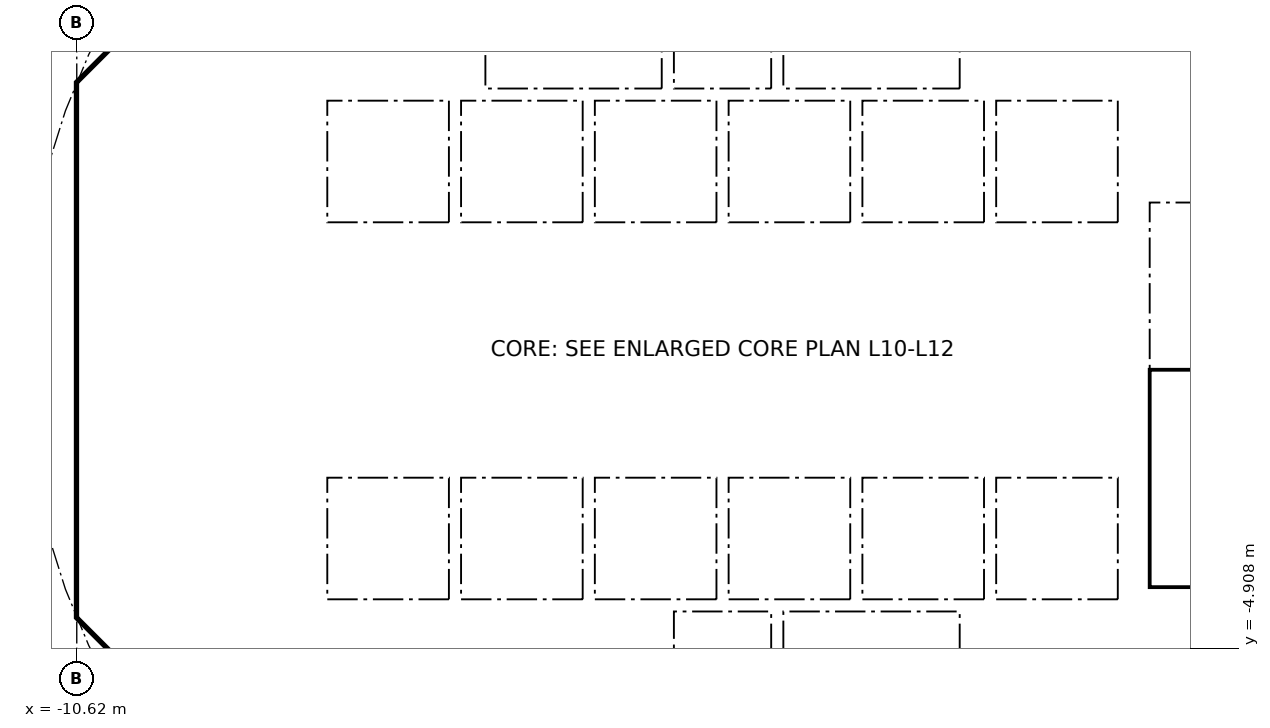
"""IFC4 building model, lengths in metres.
Left out: names, types, materials, properties, quantities, classifications, styles, units other than length and angle.
Written with IfcOpenShell. Run it as: python <this file> out.ifc"""

import sys

from ifc_helpers import new_model, si_unit, direction, frame, frame_2d, origin, place, context, subcontext, project, spatial, polyline, rectangle, outline, extrude, element, fill, save


model = new_model("IFC4")
c1 = context("Model", 3, precision=1e-05, world=origin(), true_north=direction((0.0, 1.0)))
c2 = subcontext(c1, "Body", "Model", "MODEL_VIEW")
j1 = project(units=[si_unit("LENGTHUNIT", "METRE"), si_unit("PLANEANGLEUNIT", "RADIAN")], contexts=[c1])
p1 = place(None, origin())
s1 = spatial("IfcSite", under=j1, at=p1, CompositionType="ELEMENT")
p2 = place(p1, origin())
s2 = spatial("IfcBuilding", under=s1, at=p2, CompositionType="ELEMENT")
p3 = place(p2, frame((0.0, 0.0, 45.5)))
s3 = spatial("IfcBuildingStorey", under=s2, at=p3, CompositionType="ELEMENT", Elevation=45.5)
p4 = place(p3, frame((9.988, 4.613, 0.0), z_axis=(0.0, 0.0, 1.0), x_axis=(-0.707106781187, 0.707106781187, 0.0)))
e1 = element("IfcWall", 1, at=p4, inside=s3, PredefinedType="SHEAR", context=c2, shape_type="SweptSolid", body=[
    extrude(rectangle(XDim=7.602, YDim=0.6, at=frame_2d((3.801, 0.0))), origin(), (0.0, 0.0, 1.0), 3.44),
])
p5 = place(p4, frame((3.201, 0.0, 0.0)))
e2 = element("IfcOpeningElement", 2, at=p5, cuts=e1, PredefinedType="OPENING", context=c2, shape_type="SweptSolid", body=[
    extrude(rectangle(XDim=1.2, YDim=2.1, at=frame_2d((0.6, 1.05))), frame((0.0, 0.31, 0.0), z_axis=(0.0, -1.0, 0.0), x_axis=(1.0, 0.0, 0.0)), (0.0, 0.0, 1.0), 0.62),
])
p6 = place(p3, frame((-4.613, 9.988, 0.0), z_axis=(0.0, 0.0, 1.0), x_axis=(-0.707106781187, -0.707106781187, 0.0)))
e3 = element("IfcWall", 3, at=p6, inside=s3, PredefinedType="SHEAR", context=c2, shape_type="SweptSolid", body=[
    extrude(rectangle(XDim=7.602, YDim=0.6, at=frame_2d((3.801, 0.0))), origin(), (0.0, 0.0, 1.0), 3.44),
])
p7 = place(p6, frame((0.351, 0.0, 0.0)))
e4 = element("IfcOpeningElement", 4, at=p7, cuts=e3, PredefinedType="OPENING", context=c2, shape_type="SweptSolid", body=[
    extrude(rectangle(XDim=1.1, YDim=2.1, at=frame_2d((0.55, 1.05))), frame((0.0, 0.31, 0.0), z_axis=(0.0, -1.0, 0.0), x_axis=(1.0, 0.0, 0.0)), (0.0, 0.0, 1.0), 0.62),
])
p8 = place(p3, frame((-10.325, 3.801, 0.0), z_axis=(0.0, 0.0, 1.0), x_axis=(0.0, -1.0, 0.0)))
e5 = element("IfcWall", 5, at=p8, inside=s3, PredefinedType="SHEAR", context=c2, shape_type="SweptSolid", body=[
    extrude(rectangle(XDim=7.602, YDim=0.6, at=frame_2d((3.801, 0.0))), origin(), (0.0, 0.0, 1.0), 3.44),
])
p9 = place(p8, frame((0.651, 0.0, 0.0)))
e6 = element("IfcOpeningElement", 6, at=p9, cuts=e5, PredefinedType="OPENING", context=c2, shape_type="SweptSolid", body=[
    extrude(rectangle(XDim=1.5, YDim=2.1, at=frame_2d((0.75, 1.05))), frame((0.0, 0.31, 0.0), z_axis=(0.0, -1.0, 0.0), x_axis=(1.0, 0.0, 0.0)), (0.0, 0.0, 1.0), 0.62),
])
p10 = place(p8, frame((5.451, 0.0, 0.0)))
e7 = element("IfcOpeningElement", 7, at=p10, cuts=e5, PredefinedType="OPENING", context=c2, shape_type="SweptSolid", body=[
    extrude(rectangle(XDim=1.5, YDim=2.1, at=frame_2d((0.75, 1.05))), frame((0.0, 0.31, 0.0), z_axis=(0.0, -1.0, 0.0), x_axis=(1.0, 0.0, 0.0)), (0.0, 0.0, 1.0), 0.62),
])
p11 = place(p3, frame((-9.988, -4.613, 0.0), z_axis=(0.0, 0.0, 1.0), x_axis=(0.707106781187, -0.707106781187, 0.0)))
e8 = element("IfcWall", 8, at=p11, inside=s3, PredefinedType="SHEAR", context=c2, shape_type="SweptSolid", body=[
    extrude(rectangle(XDim=7.602, YDim=0.6, at=frame_2d((3.801, 0.0))), origin(), (0.0, 0.0, 1.0), 3.44),
])
p12 = place(p11, frame((6.151, 0.0, 0.0)))
e9 = element("IfcOpeningElement", 9, at=p12, cuts=e8, PredefinedType="OPENING", context=c2, shape_type="SweptSolid", body=[
    extrude(rectangle(XDim=1.1, YDim=2.1, at=frame_2d((0.55, 1.05))), frame((0.0, 0.31, 0.0), z_axis=(0.0, -1.0, 0.0), x_axis=(1.0, 0.0, 0.0)), (0.0, 0.0, 1.0), 0.62),
])
p13 = place(p3, frame((4.613, -9.988, 0.0), z_axis=(0.0, 0.0, 1.0), x_axis=(0.707106781187, 0.707106781187, 0.0)))
e10 = element("IfcWall", 10, at=p13, inside=s3, PredefinedType="SHEAR", context=c2, shape_type="SweptSolid", body=[
    extrude(rectangle(XDim=7.602, YDim=0.6, at=frame_2d((3.801, 0.0))), origin(), (0.0, 0.0, 1.0), 3.44),
])
p14 = place(p13, frame((3.201, 0.0, 0.0)))
e11 = element("IfcOpeningElement", 11, at=p14, cuts=e10, PredefinedType="OPENING", context=c2, shape_type="SweptSolid", body=[
    extrude(rectangle(XDim=1.2, YDim=2.1, at=frame_2d((0.6, 1.05))), frame((0.0, 0.31, 0.0), z_axis=(0.0, -1.0, 0.0), x_axis=(1.0, 0.0, 0.0)), (0.0, 0.0, 1.0), 0.62),
])
p15 = place(p3, frame((-5.8, 4.3, 0.0), z_axis=(0.0, 0.0, 1.0), x_axis=(0.0, 1.0, 0.0)))
e12 = element("IfcWall", 12, at=p15, inside=s3, PredefinedType="PARTITIONING", context=c2, shape_type="SweptSolid", body=[
    extrude(rectangle(XDim=3.927, YDim=0.15, at=frame_2d((1.963, 0.0))), origin(), (0.0, 0.0, 1.0), 3.44),
])
p16 = place(p15, frame((1.551, 0.0, 0.0)))
e13 = element("IfcOpeningElement", 13, at=p16, cuts=e12, PredefinedType="OPENING", context=c2, shape_type="SweptSolid", body=[
    extrude(rectangle(XDim=0.9, YDim=2.1, at=frame_2d((0.45, 1.05))), frame((0.0, 0.085, 0.0), z_axis=(0.0, -1.0, 0.0), x_axis=(1.0, 0.0, 0.0)), (0.0, 0.0, 1.0), 0.17),
])
p17 = place(p3, frame((4.0, 4.3, 0.0), z_axis=(0.0, 0.0, 1.0), x_axis=(0.0, 1.0, 0.0)))
e14 = element("IfcWall", 14, at=p17, inside=s3, PredefinedType="SOLIDWALL", context=c2, shape_type="SweptSolid", body=[
    extrude(rectangle(XDim=2.2, YDim=0.2, at=frame_2d((1.1, 0.0))), origin(), (0.0, 0.0, 1.0), 3.44),
])
p18 = place(p17, frame((0.55, 0.0, 0.0)))
e15 = element("IfcOpeningElement", 15, at=p18, cuts=e14, PredefinedType="OPENING", context=c2, shape_type="SweptSolid", body=[
    extrude(rectangle(XDim=1.1, YDim=2.1, at=frame_2d((0.55, 1.05))), frame((0.0, 0.11, 0.0), z_axis=(0.0, -1.0, 0.0), x_axis=(1.0, 0.0, 0.0)), (0.0, 0.0, 1.0), 0.22),
])
p19 = place(p3, frame((-4.0, 4.3, 0.0), z_axis=(0.0, 0.0, 1.0), x_axis=(0.0, 1.0, 0.0)))
e16 = element("IfcWall", 16, at=p19, inside=s3, PredefinedType="SOLIDWALL", context=c2, shape_type="SweptSolid", body=[
    extrude(rectangle(XDim=2.2, YDim=0.2, at=frame_2d((1.1, 0.0))), origin(), (0.0, 0.0, 1.0), 3.44),
])
p20 = place(p19, frame((0.55, 0.0, 0.0)))
e17 = element("IfcOpeningElement", 17, at=p20, cuts=e16, PredefinedType="OPENING", context=c2, shape_type="SweptSolid", body=[
    extrude(rectangle(XDim=1.1, YDim=2.1, at=frame_2d((0.55, 1.05))), frame((0.0, 0.11, 0.0), z_axis=(0.0, -1.0, 0.0), x_axis=(1.0, 0.0, 0.0)), (0.0, 0.0, 1.0), 0.22),
])
p21 = place(p3, frame((-6.7, 2.0, 0.0), z_axis=(0.0, 0.0, 1.0), x_axis=(1.0, 0.0, 0.0)))
e18 = element("IfcWall", 18, at=p21, inside=s3, PredefinedType="SOLIDWALL", context=c2, shape_type="SweptSolid", body=[
    extrude(rectangle(XDim=13.4, YDim=0.2, at=frame_2d((6.7, 0.0))), origin(), (0.0, 0.0, 1.0), 3.44),
])
p22 = place(p21, frame((0.65, 0.0, 0.0)))
e19 = element("IfcOpeningElement", 19, at=p22, cuts=e18, PredefinedType="OPENING", context=c2, shape_type="SweptSolid", body=[
    extrude(rectangle(XDim=1.1, YDim=2.1, at=frame_2d((0.55, 1.05))), frame((0.0, 0.11, 0.0), z_axis=(0.0, -1.0, 0.0), x_axis=(1.0, 0.0, 0.0)), (0.0, 0.0, 1.0), 0.22),
])
p23 = place(p21, frame((2.85, 0.0, 0.0)))
e20 = element("IfcOpeningElement", 20, at=p23, cuts=e18, PredefinedType="OPENING", context=c2, shape_type="SweptSolid", body=[
    extrude(rectangle(XDim=1.1, YDim=2.1, at=frame_2d((0.55, 1.05))), frame((0.0, 0.11, 0.0), z_axis=(0.0, -1.0, 0.0), x_axis=(1.0, 0.0, 0.0)), (0.0, 0.0, 1.0), 0.22),
])
p24 = place(p21, frame((5.05, 0.0, 0.0)))
e21 = element("IfcOpeningElement", 21, at=p24, cuts=e18, PredefinedType="OPENING", context=c2, shape_type="SweptSolid", body=[
    extrude(rectangle(XDim=1.1, YDim=2.1, at=frame_2d((0.55, 1.05))), frame((0.0, 0.11, 0.0), z_axis=(0.0, -1.0, 0.0), x_axis=(1.0, 0.0, 0.0)), (0.0, 0.0, 1.0), 0.22),
])
p25 = place(p3, frame((6.7, 4.0, 0.0), z_axis=(0.0, 0.0, 1.0), x_axis=(1.0, 0.0, 0.0)))
e22 = element("IfcWall", 22, at=p25, inside=s3, PredefinedType="SOLIDWALL", context=c2, shape_type="SweptSolid", body=[
    extrude(rectangle(XDim=3.325, YDim=0.2, at=frame_2d((1.662, 0.0))), origin(), (0.0, 0.0, 1.0), 3.44),
])
p26 = place(p25, frame((1.25, 0.0, 0.0)))
e23 = element("IfcOpeningElement", 23, at=p26, cuts=e22, PredefinedType="OPENING", context=c2, shape_type="SweptSolid", body=[
    extrude(rectangle(XDim=1.1, YDim=2.1, at=frame_2d((0.55, 1.05))), frame((0.0, 0.11, 0.0), z_axis=(0.0, -1.0, 0.0), x_axis=(1.0, 0.0, 0.0)), (0.0, 0.0, 1.0), 0.22),
])
p27 = place(p3, frame((-6.2, -7.827, 0.0), z_axis=(0.0, 0.0, 1.0), x_axis=(0.0, 1.0, 0.0)))
e24 = element("IfcWall", 24, at=p27, inside=s3, PredefinedType="PARTITIONING", context=c2, shape_type="SweptSolid", body=[
    extrude(rectangle(XDim=3.527, YDim=0.15, at=frame_2d((1.763, 0.0))), origin(), (0.0, 0.0, 1.0), 3.44),
])
p28 = place(p27, frame((1.276, 0.0, 0.0)))
e25 = element("IfcOpeningElement", 25, at=p28, cuts=e24, PredefinedType="OPENING", context=c2, shape_type="SweptSolid", body=[
    extrude(rectangle(XDim=0.9, YDim=2.1, at=frame_2d((0.45, 1.05))), frame((0.0, 0.085, 0.0), z_axis=(0.0, -1.0, 0.0), x_axis=(1.0, 0.0, 0.0)), (0.0, 0.0, 1.0), 0.17),
])
p29 = place(p3, frame((4.0, -6.5, 0.0), z_axis=(0.0, 0.0, 1.0), x_axis=(0.0, 1.0, 0.0)))
e26 = element("IfcWall", 26, at=p29, inside=s3, PredefinedType="SOLIDWALL", context=c2, shape_type="SweptSolid", body=[
    extrude(rectangle(XDim=2.2, YDim=0.2, at=frame_2d((1.1, 0.0))), origin(), (0.0, 0.0, 1.0), 3.44),
])
p30 = place(p29, frame((0.55, 0.0, 0.0)))
e27 = element("IfcOpeningElement", 27, at=p30, cuts=e26, PredefinedType="OPENING", context=c2, shape_type="SweptSolid", body=[
    extrude(rectangle(XDim=1.1, YDim=2.1, at=frame_2d((0.55, 1.05))), frame((0.0, 0.11, 0.0), z_axis=(0.0, -1.0, 0.0), x_axis=(1.0, 0.0, 0.0)), (0.0, 0.0, 1.0), 0.22),
])
p31 = place(p3, frame((-4.0, -6.5, 0.0), z_axis=(0.0, 0.0, 1.0), x_axis=(0.0, 1.0, 0.0)))
e28 = element("IfcWall", 28, at=p31, inside=s3, PredefinedType="SOLIDWALL", context=c2, shape_type="SweptSolid", body=[
    extrude(rectangle(XDim=2.2, YDim=0.2, at=frame_2d((1.1, 0.0))), origin(), (0.0, 0.0, 1.0), 3.44),
])
p32 = place(p31, frame((0.65, 0.0, 0.0)))
e29 = element("IfcOpeningElement", 29, at=p32, cuts=e28, PredefinedType="OPENING", context=c2, shape_type="SweptSolid", body=[
    extrude(rectangle(XDim=0.9, YDim=2.1, at=frame_2d((0.45, 1.05))), frame((0.0, 0.11, 0.0), z_axis=(0.0, -1.0, 0.0), x_axis=(1.0, 0.0, 0.0)), (0.0, 0.0, 1.0), 0.22),
])
p33 = place(p3, frame((-6.7, -2.0, 0.0), z_axis=(0.0, 0.0, 1.0), x_axis=(1.0, 0.0, 0.0)))
e30 = element("IfcWall", 30, at=p33, inside=s3, PredefinedType="SOLIDWALL", context=c2, shape_type="SweptSolid", body=[
    extrude(rectangle(XDim=13.4, YDim=0.2, at=frame_2d((6.7, 0.0))), origin(), (0.0, 0.0, 1.0), 3.44),
])
p34 = place(p33, frame((0.65, 0.0, 0.0)))
e31 = element("IfcOpeningElement", 31, at=p34, cuts=e30, PredefinedType="OPENING", context=c2, shape_type="SweptSolid", body=[
    extrude(rectangle(XDim=1.1, YDim=2.1, at=frame_2d((0.55, 1.05))), frame((0.0, 0.11, 0.0), z_axis=(0.0, -1.0, 0.0), x_axis=(1.0, 0.0, 0.0)), (0.0, 0.0, 1.0), 0.22),
])
p35 = place(p33, frame((2.85, 0.0, 0.0)))
e32 = element("IfcOpeningElement", 32, at=p35, cuts=e30, PredefinedType="OPENING", context=c2, shape_type="SweptSolid", body=[
    extrude(rectangle(XDim=1.1, YDim=2.1, at=frame_2d((0.55, 1.05))), frame((0.0, 0.11, 0.0), z_axis=(0.0, -1.0, 0.0), x_axis=(1.0, 0.0, 0.0)), (0.0, 0.0, 1.0), 0.22),
])
p36 = place(p3, origin())
e33 = element("IfcWall", 33, at=p36, inside=s3, PredefinedType="SHEAR", context=c2, shape_type="SweptSolid", body=[
    extrude(outline(polyline([(-10.625, -3.801), (-10.025, -3.801), (-10.025, -4.152), (-9.776, -4.401), (-10.2, -4.825), (-10.625, -4.401), (-10.625, -3.801)])), origin(), (0.0, 0.0, 1.0), 3.44),
])
p37 = place(p3, origin())
e34 = element("IfcWall", 34, at=p37, inside=s3, PredefinedType="SHEAR", context=c2, shape_type="SweptSolid", body=[
    extrude(outline(polyline([(-10.2, 4.825), (-9.776, 4.401), (-10.025, 4.152), (-10.025, 3.801), (-10.625, 3.801), (-10.625, 4.401), (-10.2, 4.825)])), origin(), (0.0, 0.0, 1.0), 3.44),
])
for number, where, z_axis, x_axis in (
    (35, (-0.9, -6.5, 0.0), (0.0, 0.0, 1.0), (0.0, 1.0, 0.0)),
    (36, (0.9, -6.5, 0.0), (0.0, 0.0, 1.0), (0.0, 1.0, 0.0)),
):
    element("IfcWall", number, at=place(p3, frame(where, z_axis=z_axis, x_axis=x_axis)), inside=s3, PredefinedType="SOLIDWALL", context=c2, shape_type="SweptSolid", body=[
        extrude(rectangle(XDim=2.2, YDim=0.2, at=frame_2d((1.1, 0.0))), origin(), (0.0, 0.0, 1.0), 3.44),
    ])
p38 = place(p3, origin())
e37 = element("IfcWall", 37, at=p38, inside=s3, PredefinedType="SOLIDWALL", context=c2, shape_type="SweptSolid", body=[
    extrude(outline(polyline([(-6.7, -2.1), (-6.5, -2.1), (-6.5, -4.1), (-4.5, -4.1), (-4.5, -2.1), (-4.3, -2.1), (-4.3, -4.1), (-2.3, -4.1), (-2.3, -2.1), (-2.1, -2.1), (-2.1, -4.1), (-0.1, -4.1), (-0.1, -2.1), (0.1, -2.1), (0.1, -4.1), (2.1, -4.1), (2.1, -2.1), (2.3, -2.1), (2.3, -4.1), (4.3, -4.1), (4.3, -2.1), (4.5, -2.1), (4.5, -4.1), (6.5, -4.1), (6.5, -2.1), (6.7, -2.1), (6.7, -4.3), (-6.7, -4.3), (-6.7, -2.1)])), origin(), (0.0, 0.0, 1.0), 3.44),
])
for number, where, z_axis, x_axis in (
    (38, (-0.9, 4.3, 0.0), (0.0, 0.0, 1.0), (0.0, 1.0, 0.0)),
    (39, (0.9, 4.3, 0.0), (0.0, 0.0, 1.0), (0.0, 1.0, 0.0)),
):
    element("IfcWall", number, at=place(p3, frame(where, z_axis=z_axis, x_axis=x_axis)), inside=s3, PredefinedType="SOLIDWALL", context=c2, shape_type="SweptSolid", body=[
        extrude(rectangle(XDim=2.2, YDim=0.2, at=frame_2d((1.1, 0.0))), origin(), (0.0, 0.0, 1.0), 3.44),
    ])
p39 = place(p3, origin())
e40 = element("IfcWall", 40, at=p39, inside=s3, PredefinedType="SOLIDWALL", context=c2, shape_type="SweptSolid", body=[
    extrude(outline(polyline([(-6.5, 2.1), (-6.7, 2.1), (-6.7, 4.3), (6.7, 4.3), (6.7, 2.1), (6.5, 2.1), (6.5, 4.1), (4.5, 4.1), (4.5, 2.1), (4.3, 2.1), (4.3, 4.1), (2.3, 4.1), (2.3, 2.1), (2.1, 2.1), (2.1, 4.1), (0.1, 4.1), (0.1, 2.1), (-0.1, 2.1), (-0.1, 4.1), (-2.1, 4.1), (-2.1, 2.1), (-2.3, 2.1), (-2.3, 4.1), (-4.3, 4.1), (-4.3, 2.1), (-4.5, 2.1), (-4.5, 4.1), (-6.5, 4.1), (-6.5, 2.1)])), origin(), (0.0, 0.0, 1.0), 3.44),
])
for number, where, z_axis, x_axis in (
    (41, (-10.025, -4.0, 0.0), (0.0, 0.0, 1.0), (1.0, 0.0, 0.0)),
    (42, (-10.025, 4.0, 0.0), (0.0, 0.0, 1.0), (1.0, 0.0, 0.0)),
):
    element("IfcWall", number, at=place(p3, frame(where, z_axis=z_axis, x_axis=x_axis)), inside=s3, PredefinedType="PARTITIONING", context=c2, shape_type="SweptSolid", body=[
        extrude(rectangle(XDim=3.325, YDim=0.2, at=frame_2d((1.662, 0.0))), origin(), (0.0, 0.0, 1.0), 3.44),
    ])
p40 = place(p3, origin())
e43 = element("IfcWall", 43, at=p40, inside=s3, PredefinedType="SOLIDWALL", context=c2, shape_type="SweptSolid", body=[
    extrude(outline(polyline([(7.025, -3.9), (6.7, -3.9), (6.7, 3.9), (7.025, 3.9), (7.025, -3.9)])), origin(), (0.0, 0.0, 1.0), 3.44),
])
p41 = place(p3, origin())
e44 = element("IfcWall", 44, at=p41, inside=s3, PredefinedType="SOLIDWALL", context=c2, shape_type="SweptSolid", body=[
    extrude(outline(polyline([(10.025, -4.1), (6.7, -4.1), (6.7, -3.9), (10.025, -3.9), (10.025, -4.1)])), origin(), (0.0, 0.0, 1.0), 3.44),
])
p42 = place(p22, origin())
e45 = element("IfcDoor", 45, at=p42, inside=s3, OperationType="DOUBLE_DOOR_SLIDING", PredefinedType="DOOR", context=c2, shape_type="SweptSolid", body=[
    extrude(rectangle(XDim=1.1, YDim=2.1, at=frame_2d((0.55, 1.05))), frame((0.0, 0.025, 0.0), z_axis=(0.0, -1.0, 0.0), x_axis=(1.0, 0.0, 0.0)), (0.0, 0.0, 1.0), 0.05),
])
fill(e19, e45)
p43 = place(p23, origin())
e46 = element("IfcDoor", 46, at=p43, inside=s3, OperationType="DOUBLE_DOOR_SLIDING", PredefinedType="DOOR", context=c2, shape_type="SweptSolid", body=[
    extrude(rectangle(XDim=1.1, YDim=2.1, at=frame_2d((0.55, 1.05))), frame((0.0, 0.025, 0.0), z_axis=(0.0, -1.0, 0.0), x_axis=(1.0, 0.0, 0.0)), (0.0, 0.0, 1.0), 0.05),
])
fill(e20, e46)
p44 = place(p24, origin())
e47 = element("IfcDoor", 47, at=p44, inside=s3, OperationType="DOUBLE_DOOR_SLIDING", PredefinedType="DOOR", context=c2, shape_type="SweptSolid", body=[
    extrude(rectangle(XDim=1.1, YDim=2.1, at=frame_2d((0.55, 1.05))), frame((0.0, 0.025, 0.0), z_axis=(0.0, -1.0, 0.0), x_axis=(1.0, 0.0, 0.0)), (0.0, 0.0, 1.0), 0.05),
])
fill(e21, e47)
p45 = place(p34, origin())
e48 = element("IfcDoor", 48, at=p45, inside=s3, OperationType="DOUBLE_DOOR_SLIDING", PredefinedType="DOOR", context=c2, shape_type="SweptSolid", body=[
    extrude(rectangle(XDim=1.1, YDim=2.1, at=frame_2d((0.55, 1.05))), frame((0.0, 0.025, 0.0), z_axis=(0.0, -1.0, 0.0), x_axis=(1.0, 0.0, 0.0)), (0.0, 0.0, 1.0), 0.05),
])
fill(e31, e48)
p46 = place(p35, origin())
e49 = element("IfcDoor", 49, at=p46, inside=s3, OperationType="DOUBLE_DOOR_SLIDING", PredefinedType="DOOR", context=c2, shape_type="SweptSolid", body=[
    extrude(rectangle(XDim=1.1, YDim=2.1, at=frame_2d((0.55, 1.05))), frame((0.0, 0.025, 0.0), z_axis=(0.0, -1.0, 0.0), x_axis=(1.0, 0.0, 0.0)), (0.0, 0.0, 1.0), 0.05),
])
fill(e32, e49)
p47 = place(p18, origin())
e50 = element("IfcDoor", 50, at=p47, inside=s3, OperationType="DOUBLE_DOOR_SLIDING", PredefinedType="DOOR", context=c2, shape_type="SweptSolid", body=[
    extrude(rectangle(XDim=1.1, YDim=2.1, at=frame_2d((0.55, 1.05))), frame((0.0, 0.025, 0.0), z_axis=(0.0, -1.0, 0.0), x_axis=(1.0, 0.0, 0.0)), (0.0, 0.0, 1.0), 0.05),
])
fill(e15, e50)
p48 = place(p30, origin())
e51 = element("IfcDoor", 51, at=p48, inside=s3, OperationType="DOUBLE_DOOR_SLIDING", PredefinedType="DOOR", context=c2, shape_type="SweptSolid", body=[
    extrude(rectangle(XDim=1.1, YDim=2.1, at=frame_2d((0.55, 1.05))), frame((0.0, 0.025, 0.0), z_axis=(0.0, -1.0, 0.0), x_axis=(1.0, 0.0, 0.0)), (0.0, 0.0, 1.0), 0.05),
])
fill(e27, e51)
p49 = place(p20, origin())
e52 = element("IfcDoor", 52, at=p49, inside=s3, OperationType="DOUBLE_DOOR_SLIDING", PredefinedType="DOOR", context=c2, shape_type="SweptSolid", body=[
    extrude(rectangle(XDim=1.1, YDim=2.1, at=frame_2d((0.55, 1.05))), frame((0.0, 0.025, 0.0), z_axis=(0.0, -1.0, 0.0), x_axis=(1.0, 0.0, 0.0)), (0.0, 0.0, 1.0), 0.05),
])
fill(e17, e52)
p50 = place(p9, origin())
e53 = element("IfcDoor", 53, at=p50, inside=s3, OperationType="DOUBLE_DOOR_SINGLE_SWING", PredefinedType="DOOR", context=c2, shape_type="SweptSolid", body=[
    extrude(rectangle(XDim=1.5, YDim=2.1, at=frame_2d((0.75, 1.05))), frame((0.0, 0.025, 0.0), z_axis=(0.0, -1.0, 0.0), x_axis=(1.0, 0.0, 0.0)), (0.0, 0.0, 1.0), 0.05),
])
fill(e6, e53)
p51 = place(p10, origin())
e54 = element("IfcDoor", 54, at=p51, inside=s3, OperationType="DOUBLE_DOOR_SINGLE_SWING", PredefinedType="DOOR", context=c2, shape_type="SweptSolid", body=[
    extrude(rectangle(XDim=1.5, YDim=2.1, at=frame_2d((0.75, 1.05))), frame((0.0, 0.025, 0.0), z_axis=(0.0, -1.0, 0.0), x_axis=(1.0, 0.0, 0.0)), (0.0, 0.0, 1.0), 0.05),
])
fill(e7, e54)
save(model, sys.argv[1])
